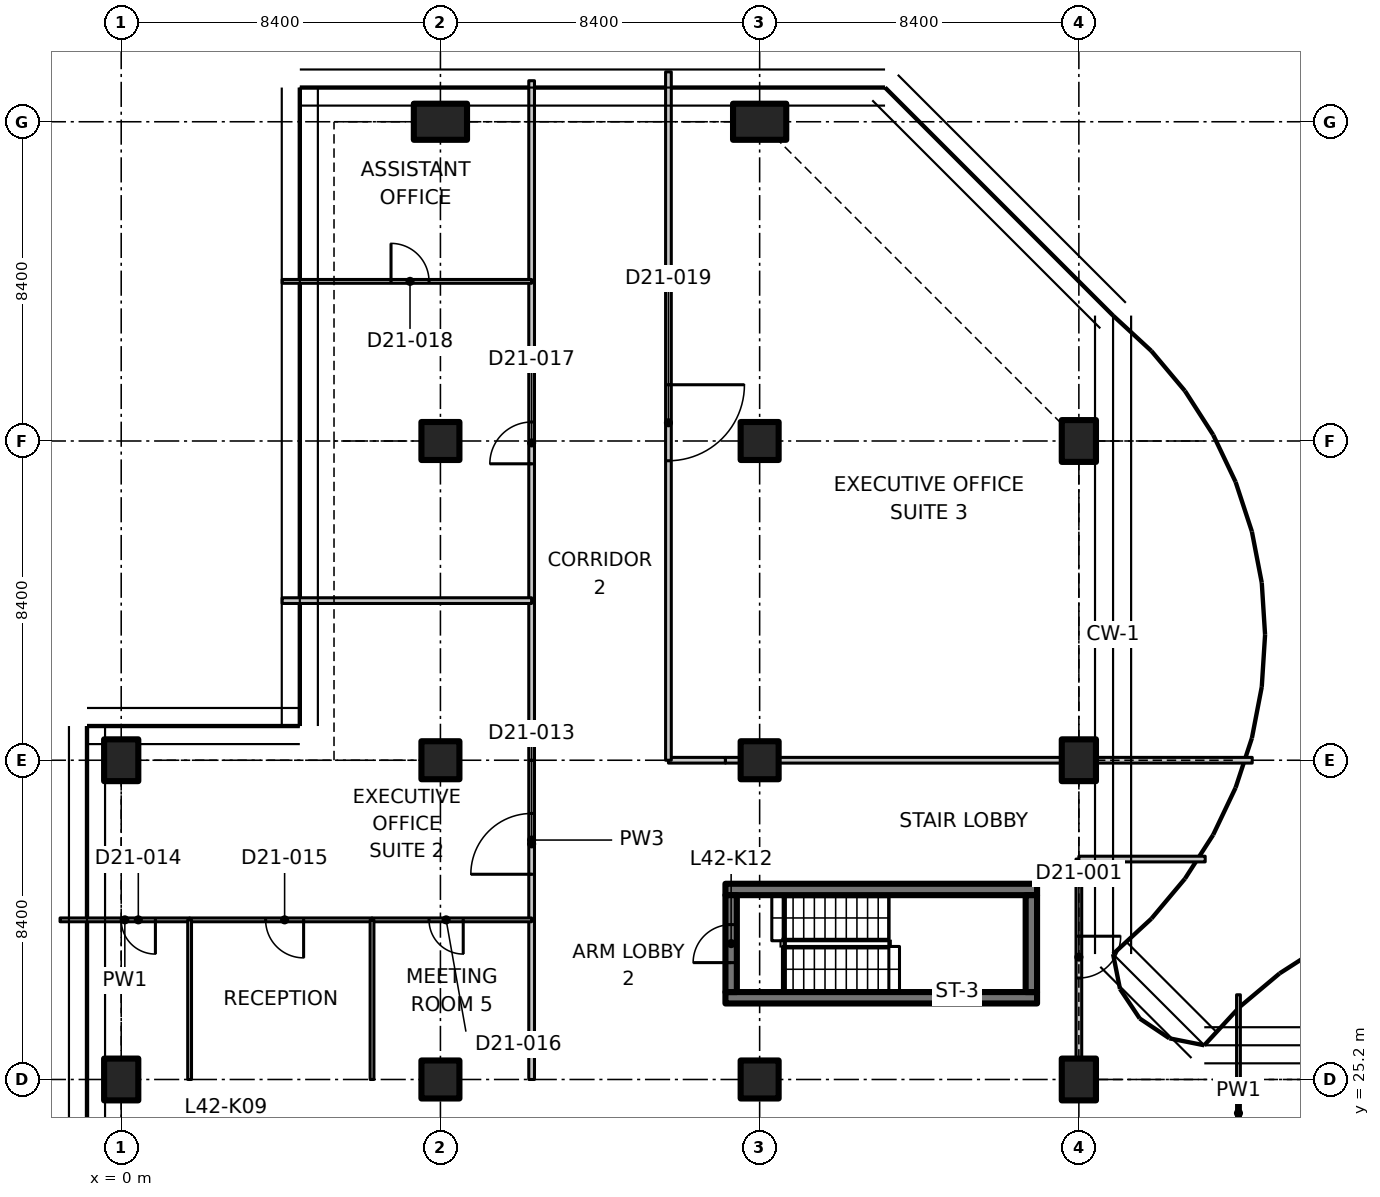
"""IFC4 building model, lengths in metres.
Left out: names, types, materials, properties, quantities, classifications, styles, units other than length and angle.
Written with IfcOpenShell. Run it as: python <this file> out.ifc"""

import sys

from ifc_helpers import new_model, si_unit, direction, frame, frame_2d, origin, origin_2d, place, context, subcontext, project, spatial, polyline, rectangle, outline, extrude, element, fill, save


model = new_model("IFC4")
c1 = context("Model", 3, precision=1e-05, world=origin(), true_north=direction((0.0, 1.0)))
c2 = subcontext(c1, "Body", "Model", "MODEL_VIEW")
j1 = project(units=[si_unit("LENGTHUNIT", "METRE"), si_unit("PLANEANGLEUNIT", "RADIAN")], contexts=[c1])
p1 = place(None, origin())
s1 = spatial("IfcSite", under=j1, at=p1, CompositionType="ELEMENT")
p2 = place(p1, origin())
s2 = spatial("IfcBuilding", under=s1, at=p2, CompositionType="ELEMENT")
p3 = place(p2, frame((0.0, 0.0, 170.4)))
s3 = spatial("IfcBuildingStorey", under=s2, at=p3, CompositionType="ELEMENT", Elevation=170.4)
for number, where, z_axis, x_axis in (
    (1, (0.0, 25.2, 0.0), (0.0, 0.0, 1.0), (1.0, 0.0, 0.0)),
    (2, (0.0, 33.6, 0.0), (0.0, 0.0, 1.0), (1.0, 0.0, 0.0)),
):
    element("IfcColumn", number, at=place(p3, frame(where, z_axis=z_axis, x_axis=x_axis)), inside=s3, PredefinedType="COLUMN", context=c2, shape_type="SweptSolid", body=[
        extrude(rectangle(XDim=0.9, YDim=1.1, at=origin_2d()), origin(), (0.0, 0.0, 1.0), 3.35),
    ])
for number, where, z_axis, x_axis in (
    (3, (8.4, 25.2, 0.0), (0.0, 0.0, 1.0), (1.0, 0.0, 0.0)),
    (4, (8.4, 33.6, 0.0), (0.0, 0.0, 1.0), (1.0, 0.0, 0.0)),
    (5, (8.4, 42.0, 0.0), (0.0, 0.0, 1.0), (1.0, 0.0, 0.0)),
):
    element("IfcColumn", number, at=place(p3, frame(where, z_axis=z_axis, x_axis=x_axis)), inside=s3, PredefinedType="COLUMN", context=c2, shape_type="SweptSolid", body=[
        extrude(rectangle(XDim=1.0, YDim=1.0, at=origin_2d()), origin(), (0.0, 0.0, 1.0), 3.35),
    ])
p4 = place(p3, frame((8.4, 50.4, 0.0), z_axis=(0.0, 0.0, 1.0), x_axis=(0.0, 1.0, 0.0)))
e6 = element("IfcColumn", 6, at=p4, inside=s3, PredefinedType="COLUMN", context=c2, shape_type="SweptSolid", body=[
    extrude(rectangle(XDim=0.95, YDim=1.4, at=origin_2d()), origin(), (0.0, 0.0, 1.0), 3.35),
])
for number, where, z_axis, x_axis in (
    (7, (16.8, 25.2, 0.0), (0.0, 0.0, 1.0), (1.0, 0.0, 0.0)),
    (8, (16.8, 33.6, 0.0), (0.0, 0.0, 1.0), (1.0, 0.0, 0.0)),
    (9, (16.8, 42.0, 0.0), (0.0, 0.0, 1.0), (1.0, 0.0, 0.0)),
):
    element("IfcColumn", number, at=place(p3, frame(where, z_axis=z_axis, x_axis=x_axis)), inside=s3, PredefinedType="COLUMN", context=c2, shape_type="SweptSolid", body=[
        extrude(rectangle(XDim=1.0, YDim=1.0, at=origin_2d()), origin(), (0.0, 0.0, 1.0), 3.35),
    ])
p5 = place(p3, frame((16.8, 50.4, 0.0), z_axis=(0.0, 0.0, 1.0), x_axis=(0.0, 1.0, 0.0)))
e10 = element("IfcColumn", 10, at=p5, inside=s3, PredefinedType="COLUMN", context=c2, shape_type="SweptSolid", body=[
    extrude(rectangle(XDim=0.95, YDim=1.4, at=origin_2d()), origin(), (0.0, 0.0, 1.0), 3.35),
])
for number, where, z_axis, x_axis in (
    (11, (25.2, 25.2, 0.0), (0.0, 0.0, 1.0), (1.0, 0.0, 0.0)),
    (12, (25.2, 33.6, 0.0), (0.0, 0.0, 1.0), (1.0, 0.0, 0.0)),
    (13, (25.2, 42.0, 0.0), (0.0, 0.0, 1.0), (1.0, 0.0, 0.0)),
):
    element("IfcColumn", number, at=place(p3, frame(where, z_axis=z_axis, x_axis=x_axis)), inside=s3, PredefinedType="COLUMN", context=c2, shape_type="SweptSolid", body=[
        extrude(rectangle(XDim=0.9, YDim=1.1, at=origin_2d()), origin(), (0.0, 0.0, 1.0), 3.35),
    ])
for number, where, z_axis, x_axis in (
    (14, (15.9, 27.35, 0.0), (0.0, 0.0, 1.0), (1.0, 0.0, 0.0)),
    (15, (15.9, 30.2, 0.0), (0.0, 0.0, 1.0), (1.0, 0.0, 0.0)),
):
    element("IfcWall", number, at=place(p3, frame(where, z_axis=z_axis, x_axis=x_axis)), inside=s3, PredefinedType="SHEAR", context=c2, shape_type="SweptSolid", body=[
        extrude(rectangle(XDim=8.2, YDim=0.3, at=frame_2d((4.1, 0.0))), origin(), (0.0, 0.0, 1.0), 3.35),
    ])
p6 = place(p3, frame((16.05, 27.5, 0.0), z_axis=(0.0, 0.0, 1.0), x_axis=(0.0, 1.0, 0.0)))
e16 = element("IfcWall", 16, at=p6, inside=s3, PredefinedType="SHEAR", context=c2, shape_type="SweptSolid", body=[
    extrude(rectangle(XDim=2.55, YDim=0.3, at=frame_2d((1.275, 0.0))), origin(), (0.0, 0.0, 1.0), 3.35),
])
p7 = place(p6, frame((0.775, 0.0, 0.0)))
e17 = element("IfcOpeningElement", 17, at=p7, cuts=e16, PredefinedType="OPENING", context=c2, shape_type="SweptSolid", body=[
    extrude(rectangle(XDim=1.0, YDim=2.1, at=frame_2d((0.5, 1.05))), frame((0.0, 0.16, 0.0), z_axis=(0.0, -1.0, 0.0), x_axis=(1.0, 0.0, 0.0)), (0.0, 0.0, 1.0), 0.32),
])
p8 = place(p3, frame((23.95, 27.5, 0.0), z_axis=(0.0, 0.0, 1.0), x_axis=(0.0, 1.0, 0.0)))
e18 = element("IfcWall", 18, at=p8, inside=s3, PredefinedType="SHEAR", context=c2, shape_type="SweptSolid", body=[
    extrude(rectangle(XDim=2.55, YDim=0.3, at=frame_2d((1.275, 0.0))), origin(), (0.0, 0.0, 1.0), 3.35),
])
p9 = place(p3, frame((29.4, 27.429, 0.0), z_axis=(0.0, 0.0, 1.0), x_axis=(0.0, -1.0, 0.0)))
e19 = element("IfcWall", 19, at=p9, inside=s3, PredefinedType="PARTITIONING", context=c2, shape_type="SweptSolid", body=[
    extrude(outline(polyline([(0.0, 0.0), (6.229, 0.0), (6.229, 3.33), (2.679, 3.33), (2.677, 2.98), (1.781, 2.98), (1.779, 3.33), (0.154, 3.33), (0.0, 3.33), (0.0, 0.0)])), frame((0.0, 0.05, 0.0), z_axis=(0.0, -1.0, 0.0), x_axis=(1.0, 0.0, 0.0)), (0.0, 0.0, 1.0), 0.1),
])
p10 = place(p3, frame((25.2, 31.0, 0.0), z_axis=(0.0, 0.0, 1.0), x_axis=(0.0, -1.0, 0.0)))
e20 = element("IfcWall", 20, at=p10, inside=s3, PredefinedType="PARTITIONING", context=c2, shape_type="SweptSolid", body=[
    extrude(outline(polyline([(0.0, 0.0), (5.23, 0.0), (5.23, 2.98), (0.0, 2.98), (0.0, 0.0)])), frame((0.0, 0.075, 0.0), z_axis=(0.0, -1.0, 0.0), x_axis=(1.0, 0.0, 0.0)), (0.0, 0.0, 1.0), 0.15),
])
p11 = place(p10, frame((2.03, 0.0, 0.0)))
e21 = element("IfcOpeningElement", 21, at=p11, cuts=e20, PredefinedType="OPENING", context=c2, shape_type="SweptSolid", body=[
    extrude(rectangle(XDim=1.1, YDim=2.1, at=frame_2d((0.55, 1.05))), frame((0.0, 0.085, 0.0), z_axis=(0.0, -1.0, 0.0), x_axis=(1.0, 0.0, 0.0)), (0.0, 0.0, 1.0), 0.17),
])
p12 = place(p3, frame((25.2, 31.0, 0.0), z_axis=(0.0, 0.0, 1.0), x_axis=(1.0, 0.0, 0.0)))
e22 = element("IfcWall", 22, at=p12, inside=s3, PredefinedType="PARTITIONING", context=c2, shape_type="SweptSolid", body=[
    extrude(rectangle(XDim=3.324, YDim=0.15, at=frame_2d((1.662, 0.0))), origin(), (0.0, 0.0, 1.0), 2.98),
])
p13 = place(p3, frame((10.8, 29.4, 0.0), z_axis=(0.0, 0.0, 1.0), x_axis=(0.0, 1.0, 0.0)))
e23 = element("IfcWall", 23, at=p13, inside=s3, PredefinedType="PARTITIONING", context=c2, shape_type="SweptSolid", body=[
    extrude(rectangle(XDim=4.2, YDim=0.15, at=frame_2d((2.1, 0.0))), origin(), (0.0, 0.0, 1.0), 3.33),
])
p14 = place(p13, frame((1.2, 0.0, 0.0)))
e24 = element("IfcOpeningElement", 24, at=p14, cuts=e23, PredefinedType="OPENING", context=c2, shape_type="SweptSolid", body=[
    extrude(rectangle(XDim=1.6, YDim=2.1, at=frame_2d((0.8, 1.05))), frame((0.0, 0.085, 0.0), z_axis=(0.0, -1.0, 0.0), x_axis=(1.0, 0.0, 0.0)), (0.0, 0.0, 1.0), 0.17),
])
p15 = place(p3, frame((10.8, 25.2, 0.0), z_axis=(0.0, 0.0, 1.0), x_axis=(0.0, 1.0, 0.0)))
e25 = element("IfcWall", 25, at=p15, inside=s3, PredefinedType="PARTITIONING", context=c2, shape_type="SweptSolid", body=[
    extrude(rectangle(XDim=4.2, YDim=0.15, at=frame_2d((2.1, 0.0))), origin(), (0.0, 0.0, 1.0), 3.33),
])
p16 = place(p3, frame((14.4, 33.6, 0.0), z_axis=(0.0, 0.0, 1.0), x_axis=(1.0, 0.0, 0.0)))
e26 = element("IfcWall", 26, at=p16, inside=s3, PredefinedType="PARTITIONING", context=c2, shape_type="SweptSolid", body=[
    extrude(rectangle(XDim=1.5, YDim=0.15, at=frame_2d((0.75, 0.0))), origin(), (0.0, 0.0, 1.0), 3.33),
])
p17 = place(p3, frame((15.9, 33.6, 0.0), z_axis=(0.0, 0.0, 1.0), x_axis=(1.0, 0.0, 0.0)))
e27 = element("IfcWall", 27, at=p17, inside=s3, PredefinedType="PARTITIONING", context=c2, shape_type="SweptSolid", body=[
    extrude(rectangle(XDim=0.38, YDim=0.15, at=frame_2d((0.19, 0.0))), origin(), (0.0, 0.0, 1.0), 3.33),
])
p18 = place(p3, frame((17.32, 33.6, 0.0), z_axis=(0.0, 0.0, 1.0), x_axis=(1.0, 0.0, 0.0)))
e28 = element("IfcWall", 28, at=p18, inside=s3, PredefinedType="PARTITIONING", context=c2, shape_type="SweptSolid", body=[
    extrude(rectangle(XDim=7.41, YDim=0.15, at=frame_2d((3.705, 0.0))), origin(), (0.0, 0.0, 1.0), 3.33),
])
p19 = place(p3, frame((25.67, 33.6, 0.0), z_axis=(0.0, 0.0, 1.0), x_axis=(1.0, 0.0, 0.0)))
e29 = element("IfcWall", 29, at=p19, inside=s3, PredefinedType="PARTITIONING", context=c2, shape_type="SweptSolid", body=[
    extrude(rectangle(XDim=4.092, YDim=0.15, at=frame_2d((2.046, 0.0))), origin(), (0.0, 0.0, 1.0), 2.98),
])
p20 = place(p3, frame((10.8, 33.6, 0.0), z_axis=(0.0, 0.0, 1.0), x_axis=(0.0, 1.0, 0.0)))
e30 = element("IfcWall", 30, at=p20, inside=s3, PredefinedType="PARTITIONING", context=c2, shape_type="SweptSolid", body=[
    extrude(rectangle(XDim=4.2, YDim=0.15, at=frame_2d((2.1, 0.0))), origin(), (0.0, 0.0, 1.0), 3.33),
])
p21 = place(p3, frame((10.8, 37.8, 0.0), z_axis=(0.0, 0.0, 1.0), x_axis=(0.0, 1.0, 0.0)))
e31 = element("IfcWall", 31, at=p21, inside=s3, PredefinedType="PARTITIONING", context=c2, shape_type="SweptSolid", body=[
    extrude(rectangle(XDim=8.4, YDim=0.15, at=frame_2d((4.2, 0.0))), origin(), (0.0, 0.0, 1.0), 3.33),
])
p22 = place(p21, frame((3.6, 0.0, 0.0)))
e32 = element("IfcOpeningElement", 32, at=p22, cuts=e31, PredefinedType="OPENING", context=c2, shape_type="SweptSolid", body=[
    extrude(rectangle(XDim=1.1, YDim=2.1, at=frame_2d((0.55, 1.05))), frame((0.0, 0.085, 0.0), z_axis=(0.0, -1.0, 0.0), x_axis=(1.0, 0.0, 0.0)), (0.0, 0.0, 1.0), 0.17),
])
p23 = place(p3, frame((10.8, 46.2, 0.0), z_axis=(0.0, 0.0, 1.0), x_axis=(0.0, 1.0, 0.0)))
e33 = element("IfcWall", 33, at=p23, inside=s3, PredefinedType="PARTITIONING", context=c2, shape_type="SweptSolid", body=[
    extrude(outline(polyline([(0.0, 0.0), (5.28, 0.0), (5.28, 3.33), (4.65, 3.33), (4.648, 2.98), (3.752, 2.98), (3.75, 3.33), (0.0, 3.33), (0.0, 0.0)])), frame((0.0, 0.075, 0.0), z_axis=(0.0, -1.0, 0.0), x_axis=(1.0, 0.0, 0.0)), (0.0, 0.0, 1.0), 0.15),
])
p24 = place(p3, frame((14.4, 51.713, 0.0), z_axis=(0.0, 0.0, 1.0), x_axis=(0.0, -1.0, 0.0)))
e34 = element("IfcWall", 34, at=p24, inside=s3, PredefinedType="PARTITIONING", context=c2, shape_type="SweptSolid", body=[
    extrude(outline(polyline([(0.0, 0.0), (18.113, 0.0), (18.113, 3.33), (1.763, 3.33), (1.761, 2.98), (0.865, 2.98), (0.863, 3.33), (0.233, 3.33), (0.0, 3.33), (0.0, 0.0)])), frame((0.0, 0.075, 0.0), z_axis=(0.0, -1.0, 0.0), x_axis=(1.0, 0.0, 0.0)), (0.0, 0.0, 1.0), 0.15),
])
p25 = place(p24, frame((8.233, 0.0, 0.0)))
e35 = element("IfcOpeningElement", 35, at=p25, cuts=e34, PredefinedType="OPENING", context=c2, shape_type="SweptSolid", body=[
    extrude(rectangle(XDim=2.0, YDim=2.4, at=frame_2d((1.0, 1.2))), frame((0.0, 0.085, 0.0), z_axis=(0.0, -1.0, 0.0), x_axis=(1.0, 0.0, 0.0)), (0.0, 0.0, 1.0), 0.17),
])
p26 = place(p3, frame((1.8, 29.4, 0.0), z_axis=(0.0, 0.0, 1.0), x_axis=(-1.0, 0.0, 0.0)))
e36 = element("IfcWall", 36, at=p26, inside=s3, PredefinedType="PARTITIONING", context=c2, shape_type="SweptSolid", body=[
    extrude(rectangle(XDim=3.409, YDim=0.1, at=frame_2d((1.705, 0.0))), origin(), (0.0, 0.0, 1.0), 2.98),
])
p27 = place(p26, frame((0.9, 0.0, 0.0)))
e37 = element("IfcOpeningElement", 37, at=p27, cuts=e36, PredefinedType="OPENING", context=c2, shape_type="SweptSolid", body=[
    extrude(rectangle(XDim=0.9, YDim=2.1, at=frame_2d((0.45, 1.05))), frame((0.0, 0.06, 0.0), z_axis=(0.0, -1.0, 0.0), x_axis=(1.0, 0.0, 0.0)), (0.0, 0.0, 1.0), 0.12),
])
p28 = place(p3, frame((6.6, 29.4, 0.0), z_axis=(0.0, 0.0, 1.0), x_axis=(-1.0, 0.0, 0.0)))
e38 = element("IfcWall", 38, at=p28, inside=s3, PredefinedType="PARTITIONING", context=c2, shape_type="SweptSolid", body=[
    extrude(rectangle(XDim=4.8, YDim=0.1, at=frame_2d((2.4, 0.0))), origin(), (0.0, 0.0, 1.0), 3.33),
])
p29 = place(p28, frame((1.8, 0.0, 0.0)))
e39 = element("IfcOpeningElement", 39, at=p29, cuts=e38, PredefinedType="OPENING", context=c2, shape_type="SweptSolid", body=[
    extrude(rectangle(XDim=1.0, YDim=2.1, at=frame_2d((0.5, 1.05))), frame((0.0, 0.06, 0.0), z_axis=(0.0, -1.0, 0.0), x_axis=(1.0, 0.0, 0.0)), (0.0, 0.0, 1.0), 0.12),
])
p30 = place(p3, frame((10.8, 29.4, 0.0), z_axis=(0.0, 0.0, 1.0), x_axis=(-1.0, 0.0, 0.0)))
e40 = element("IfcWall", 40, at=p30, inside=s3, PredefinedType="PARTITIONING", context=c2, shape_type="SweptSolid", body=[
    extrude(rectangle(XDim=4.2, YDim=0.1, at=frame_2d((2.1, 0.0))), origin(), (0.0, 0.0, 1.0), 3.33),
])
p31 = place(p30, frame((1.8, 0.0, 0.0)))
e41 = element("IfcOpeningElement", 41, at=p31, cuts=e40, PredefinedType="OPENING", context=c2, shape_type="SweptSolid", body=[
    extrude(rectangle(XDim=0.9, YDim=2.1, at=frame_2d((0.45, 1.05))), frame((0.0, 0.06, 0.0), z_axis=(0.0, -1.0, 0.0), x_axis=(1.0, 0.0, 0.0)), (0.0, 0.0, 1.0), 0.12),
])
p32 = place(p3, frame((4.235, 37.8, 0.0), z_axis=(0.0, 0.0, 1.0), x_axis=(1.0, 0.0, 0.0)))
e42 = element("IfcWall", 42, at=p32, inside=s3, PredefinedType="PARTITIONING", context=c2, shape_type="SweptSolid", body=[
    extrude(outline(polyline([(0.0, 0.0), (6.565, 0.0), (6.565, 3.33), (1.815, 3.33), (1.813, 2.98), (0.917, 2.98), (0.915, 3.33), (0.265, 3.33), (0.0, 3.33), (0.0, 0.0)])), frame((0.0, 0.075, 0.0), z_axis=(0.0, -1.0, 0.0), x_axis=(1.0, 0.0, 0.0)), (0.0, 0.0, 1.0), 0.15),
])
for number, where, z_axis, x_axis in (
    (43, (1.8, 29.4, 0.0), (0.0, 0.0, 1.0), (0.0, -1.0, 0.0)),
    (44, (6.6, 29.4, 0.0), (0.0, 0.0, 1.0), (0.0, -1.0, 0.0)),
):
    element("IfcWall", number, at=place(p3, frame(where, z_axis=z_axis, x_axis=x_axis)), inside=s3, PredefinedType="PARTITIONING", context=c2, shape_type="SweptSolid", body=[
        extrude(rectangle(XDim=4.2, YDim=0.1, at=frame_2d((2.1, 0.0))), origin(), (0.0, 0.0, 1.0), 3.33),
    ])
p33 = place(p3, frame((4.235, 46.2, 0.0), z_axis=(0.0, 0.0, 1.0), x_axis=(1.0, 0.0, 0.0)))
e45 = element("IfcWall", 45, at=p33, inside=s3, PredefinedType="PARTITIONING", context=c2, shape_type="SweptSolid", body=[
    extrude(outline(polyline([(0.0, 0.0), (6.565, 0.0), (6.565, 3.33), (1.815, 3.33), (1.813, 2.98), (0.917, 2.98), (0.915, 3.33), (0.265, 3.33), (0.0, 3.33), (0.0, 0.0)])), frame((0.0, 0.05, 0.0), z_axis=(0.0, -1.0, 0.0), x_axis=(1.0, 0.0, 0.0)), (0.0, 0.0, 1.0), 0.1),
])
p34 = place(p33, frame((2.865, 0.0, 0.0)))
e46 = element("IfcOpeningElement", 46, at=p34, cuts=e45, PredefinedType="OPENING", context=c2, shape_type="SweptSolid", body=[
    extrude(rectangle(XDim=1.0, YDim=2.1, at=frame_2d((0.5, 1.05))), frame((0.0, 0.06, 0.0), z_axis=(0.0, -1.0, 0.0), x_axis=(1.0, 0.0, 0.0)), (0.0, 0.0, 1.0), 0.12),
])
p35 = place(p7, origin())
e47 = element("IfcDoor", 47, at=p35, inside=s3, OperationType="SINGLE_SWING_LEFT", PredefinedType="DOOR", context=c2, shape_type="SweptSolid", body=[
    extrude(rectangle(XDim=1.0, YDim=2.1, at=frame_2d((0.5, 1.05))), frame((0.0, 0.025, 0.0), z_axis=(0.0, -1.0, 0.0), x_axis=(1.0, 0.0, 0.0)), (0.0, 0.0, 1.0), 0.05),
])
fill(e17, e47)
p36 = place(p11, origin())
e48 = element("IfcDoor", 48, at=p36, inside=s3, OperationType="SINGLE_SWING_RIGHT", PredefinedType="DOOR", context=c2, shape_type="SweptSolid", body=[
    extrude(rectangle(XDim=1.1, YDim=2.1, at=frame_2d((0.55, 1.05))), frame((0.0, 0.025, 0.0), z_axis=(0.0, -1.0, 0.0), x_axis=(1.0, 0.0, 0.0)), (0.0, 0.0, 1.0), 0.05),
])
fill(e21, e48)
p37 = place(p14, origin())
e49 = element("IfcDoor", 49, at=p37, inside=s3, OperationType="DOUBLE_DOOR_SINGLE_SWING", PredefinedType="DOOR", context=c2, shape_type="SweptSolid", body=[
    extrude(rectangle(XDim=1.6, YDim=2.1, at=frame_2d((0.8, 1.05))), frame((0.0, 0.025, 0.0), z_axis=(0.0, -1.0, 0.0), x_axis=(1.0, 0.0, 0.0)), (0.0, 0.0, 1.0), 0.05),
])
fill(e24, e49)
p38 = place(p27, origin())
e50 = element("IfcDoor", 50, at=p38, inside=s3, OperationType="SINGLE_SWING_LEFT", PredefinedType="DOOR", context=c2, shape_type="SweptSolid", body=[
    extrude(rectangle(XDim=0.9, YDim=2.1, at=frame_2d((0.45, 1.05))), frame((0.0, 0.025, 0.0), z_axis=(0.0, -1.0, 0.0), x_axis=(1.0, 0.0, 0.0)), (0.0, 0.0, 1.0), 0.05),
])
fill(e37, e50)
p39 = place(p29, origin())
e51 = element("IfcDoor", 51, at=p39, inside=s3, OperationType="SINGLE_SWING_LEFT", PredefinedType="DOOR", context=c2, shape_type="SweptSolid", body=[
    extrude(rectangle(XDim=1.0, YDim=2.1, at=frame_2d((0.5, 1.05))), frame((0.0, 0.025, 0.0), z_axis=(0.0, -1.0, 0.0), x_axis=(1.0, 0.0, 0.0)), (0.0, 0.0, 1.0), 0.05),
])
fill(e39, e51)
p40 = place(p31, origin())
e52 = element("IfcDoor", 52, at=p40, inside=s3, OperationType="SINGLE_SWING_LEFT", PredefinedType="DOOR", context=c2, shape_type="SweptSolid", body=[
    extrude(rectangle(XDim=0.9, YDim=2.1, at=frame_2d((0.45, 1.05))), frame((0.0, 0.025, 0.0), z_axis=(0.0, -1.0, 0.0), x_axis=(1.0, 0.0, 0.0)), (0.0, 0.0, 1.0), 0.05),
])
fill(e41, e52)
p41 = place(p22, origin())
e53 = element("IfcDoor", 53, at=p41, inside=s3, OperationType="SINGLE_SWING_LEFT", PredefinedType="DOOR", context=c2, shape_type="SweptSolid", body=[
    extrude(rectangle(XDim=1.1, YDim=2.1, at=frame_2d((0.55, 1.05))), frame((0.0, 0.025, 0.0), z_axis=(0.0, -1.0, 0.0), x_axis=(1.0, 0.0, 0.0)), (0.0, 0.0, 1.0), 0.05),
])
fill(e32, e53)
p42 = place(p34, origin())
e54 = element("IfcDoor", 54, at=p42, inside=s3, OperationType="SINGLE_SWING_LEFT", PredefinedType="DOOR", context=c2, shape_type="SweptSolid", body=[
    extrude(rectangle(XDim=1.0, YDim=2.1, at=frame_2d((0.5, 1.05))), frame((0.0, 0.025, 0.0), z_axis=(0.0, -1.0, 0.0), x_axis=(1.0, 0.0, 0.0)), (0.0, 0.0, 1.0), 0.05),
])
fill(e46, e54)
p43 = place(p25, origin())
e55 = element("IfcDoor", 55, at=p43, inside=s3, OperationType="DOUBLE_DOOR_SINGLE_SWING", PredefinedType="DOOR", context=c2, shape_type="SweptSolid", body=[
    extrude(rectangle(XDim=2.0, YDim=2.4, at=frame_2d((1.0, 1.2))), frame((0.0, 0.025, 0.0), z_axis=(0.0, -1.0, 0.0), x_axis=(1.0, 0.0, 0.0)), (0.0, 0.0, 1.0), 0.05),
])
fill(e35, e55)
save(model, sys.argv[1])
